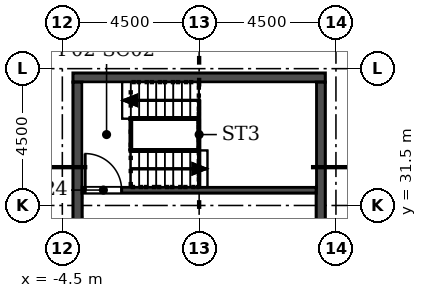
"""IFC4 building model, lengths in metres.
Left out: names, types, materials, properties, quantities, classifications, styles, units other than length and angle.
Written with IfcOpenShell. Run it as: python <this file> out.ifc"""

import sys

from ifc_helpers import new_model, si_unit, direction, frame, frame_2d, origin, place, context, subcontext, project, spatial, rectangle, extrude, element, fill, save


model = new_model("IFC4")
c1 = context("Model", 3, precision=1e-05, world=origin(), true_north=direction((0.0, 1.0)))
c2 = subcontext(c1, "Body", "Model", "MODEL_VIEW")
j1 = project(units=[si_unit("LENGTHUNIT", "METRE"), si_unit("PLANEANGLEUNIT", "RADIAN")], contexts=[c1])
p1 = place(None, origin())
s1 = spatial("IfcSite", under=j1, at=p1, CompositionType="ELEMENT")
p2 = place(p1, origin())
s2 = spatial("IfcBuilding", under=s1, at=p2, CompositionType="ELEMENT")
p3 = place(p2, frame((0.0, 0.0, 14.0)))
s3 = spatial("IfcBuildingStorey", under=s2, at=p3, CompositionType="ELEMENT", Elevation=14.0)
p4 = place(p3, frame((42.853, 8.575, 0.0), z_axis=(0.0, 0.0, 1.0), x_axis=(-0.49999894854, 0.866026010844, 0.0)))
e1 = element("IfcWall", 1, at=p4, inside=s3, PredefinedType="SOLIDWALL", context=c2, shape_type="SweptSolid", body=[
    extrude(rectangle(XDim=76.0, YDim=0.34, at=frame_2d((38.0, 0.0))), origin(), (0.0, 0.0, 1.0), 5.7),
])
p5 = place(p4, frame((1.058, 0.0, 0.9)))
e2 = element("IfcOpeningElement", 2, at=p5, cuts=e1, PredefinedType="OPENING", context=c2, shape_type="SweptSolid", body=[
    extrude(rectangle(XDim=1.885, YDim=3.5, at=frame_2d((0.942, 1.75))), frame((0.0, 0.18, 0.0), z_axis=(0.0, -1.0, 0.0), x_axis=(1.0, 0.0, 0.0)), (0.0, 0.0, 1.0), 0.36),
])
p6 = place(p4, frame((4.058, 0.0, 0.9)))
e3 = element("IfcOpeningElement", 3, at=p6, cuts=e1, PredefinedType="OPENING", context=c2, shape_type="SweptSolid", body=[
    extrude(rectangle(XDim=1.885, YDim=3.5, at=frame_2d((0.942, 1.75))), frame((0.0, 0.18, 0.0), z_axis=(0.0, -1.0, 0.0), x_axis=(1.0, 0.0, 0.0)), (0.0, 0.0, 1.0), 0.36),
])
p7 = place(p4, frame((7.058, 0.0, 0.9)))
e4 = element("IfcOpeningElement", 4, at=p7, cuts=e1, PredefinedType="OPENING", context=c2, shape_type="SweptSolid", body=[
    extrude(rectangle(XDim=1.885, YDim=3.5, at=frame_2d((0.942, 1.75))), frame((0.0, 0.18, 0.0), z_axis=(0.0, -1.0, 0.0), x_axis=(1.0, 0.0, 0.0)), (0.0, 0.0, 1.0), 0.36),
])
p8 = place(p4, frame((10.058, 0.0, 0.9)))
e5 = element("IfcOpeningElement", 5, at=p8, cuts=e1, PredefinedType="OPENING", context=c2, shape_type="SweptSolid", body=[
    extrude(rectangle(XDim=1.885, YDim=3.5, at=frame_2d((0.942, 1.75))), frame((0.0, 0.18, 0.0), z_axis=(0.0, -1.0, 0.0), x_axis=(1.0, 0.0, 0.0)), (0.0, 0.0, 1.0), 0.36),
])
p9 = place(p4, frame((13.058, 0.0, 0.9)))
e6 = element("IfcOpeningElement", 6, at=p9, cuts=e1, PredefinedType="OPENING", context=c2, shape_type="SweptSolid", body=[
    extrude(rectangle(XDim=1.885, YDim=3.5, at=frame_2d((0.942, 1.75))), frame((0.0, 0.18, 0.0), z_axis=(0.0, -1.0, 0.0), x_axis=(1.0, 0.0, 0.0)), (0.0, 0.0, 1.0), 0.36),
])
p10 = place(p4, frame((16.058, 0.0, 0.9)))
e7 = element("IfcOpeningElement", 7, at=p10, cuts=e1, PredefinedType="OPENING", context=c2, shape_type="SweptSolid", body=[
    extrude(rectangle(XDim=1.885, YDim=3.5, at=frame_2d((0.942, 1.75))), frame((0.0, 0.18, 0.0), z_axis=(0.0, -1.0, 0.0), x_axis=(1.0, 0.0, 0.0)), (0.0, 0.0, 1.0), 0.36),
])
p11 = place(p4, frame((19.058, 0.0, 0.9)))
e8 = element("IfcOpeningElement", 8, at=p11, cuts=e1, PredefinedType="OPENING", context=c2, shape_type="SweptSolid", body=[
    extrude(rectangle(XDim=1.885, YDim=3.5, at=frame_2d((0.942, 1.75))), frame((0.0, 0.18, 0.0), z_axis=(0.0, -1.0, 0.0), x_axis=(1.0, 0.0, 0.0)), (0.0, 0.0, 1.0), 0.36),
])
p12 = place(p4, frame((22.058, 0.0, 0.9)))
e9 = element("IfcOpeningElement", 9, at=p12, cuts=e1, PredefinedType="OPENING", context=c2, shape_type="SweptSolid", body=[
    extrude(rectangle(XDim=1.885, YDim=3.5, at=frame_2d((0.942, 1.75))), frame((0.0, 0.18, 0.0), z_axis=(0.0, -1.0, 0.0), x_axis=(1.0, 0.0, 0.0)), (0.0, 0.0, 1.0), 0.36),
])
p13 = place(p4, frame((25.058, 0.0, 0.9)))
e10 = element("IfcOpeningElement", 10, at=p13, cuts=e1, PredefinedType="OPENING", context=c2, shape_type="SweptSolid", body=[
    extrude(rectangle(XDim=1.885, YDim=3.5, at=frame_2d((0.942, 1.75))), frame((0.0, 0.18, 0.0), z_axis=(0.0, -1.0, 0.0), x_axis=(1.0, 0.0, 0.0)), (0.0, 0.0, 1.0), 0.36),
])
p14 = place(p4, frame((28.058, 0.0, 0.9)))
e11 = element("IfcOpeningElement", 11, at=p14, cuts=e1, PredefinedType="OPENING", context=c2, shape_type="SweptSolid", body=[
    extrude(rectangle(XDim=1.885, YDim=3.5, at=frame_2d((0.942, 1.75))), frame((0.0, 0.18, 0.0), z_axis=(0.0, -1.0, 0.0), x_axis=(1.0, 0.0, 0.0)), (0.0, 0.0, 1.0), 0.36),
])
p15 = place(p4, frame((31.058, 0.0, 0.9)))
e12 = element("IfcOpeningElement", 12, at=p15, cuts=e1, PredefinedType="OPENING", context=c2, shape_type="SweptSolid", body=[
    extrude(rectangle(XDim=1.885, YDim=3.5, at=frame_2d((0.942, 1.75))), frame((0.0, 0.18, 0.0), z_axis=(0.0, -1.0, 0.0), x_axis=(1.0, 0.0, 0.0)), (0.0, 0.0, 1.0), 0.36),
])
p16 = place(p4, frame((34.058, 0.0, 0.9)))
e13 = element("IfcOpeningElement", 13, at=p16, cuts=e1, PredefinedType="OPENING", context=c2, shape_type="SweptSolid", body=[
    extrude(rectangle(XDim=1.885, YDim=3.5, at=frame_2d((0.942, 1.75))), frame((0.0, 0.18, 0.0), z_axis=(0.0, -1.0, 0.0), x_axis=(1.0, 0.0, 0.0)), (0.0, 0.0, 1.0), 0.36),
])
p17 = place(p4, frame((37.058, 0.0, 0.9)))
e14 = element("IfcOpeningElement", 14, at=p17, cuts=e1, PredefinedType="OPENING", context=c2, shape_type="SweptSolid", body=[
    extrude(rectangle(XDim=1.885, YDim=3.5, at=frame_2d((0.942, 1.75))), frame((0.0, 0.18, 0.0), z_axis=(0.0, -1.0, 0.0), x_axis=(1.0, 0.0, 0.0)), (0.0, 0.0, 1.0), 0.36),
])
p18 = place(p4, frame((40.058, 0.0, 0.9)))
e15 = element("IfcOpeningElement", 15, at=p18, cuts=e1, PredefinedType="OPENING", context=c2, shape_type="SweptSolid", body=[
    extrude(rectangle(XDim=1.885, YDim=3.5, at=frame_2d((0.942, 1.75))), frame((0.0, 0.18, 0.0), z_axis=(0.0, -1.0, 0.0), x_axis=(1.0, 0.0, 0.0)), (0.0, 0.0, 1.0), 0.36),
])
p19 = place(p4, frame((43.058, 0.0, 0.9)))
e16 = element("IfcOpeningElement", 16, at=p19, cuts=e1, PredefinedType="OPENING", context=c2, shape_type="SweptSolid", body=[
    extrude(rectangle(XDim=1.885, YDim=3.5, at=frame_2d((0.942, 1.75))), frame((0.0, 0.18, 0.0), z_axis=(0.0, -1.0, 0.0), x_axis=(1.0, 0.0, 0.0)), (0.0, 0.0, 1.0), 0.36),
])
p20 = place(p4, frame((46.058, 0.0, 0.9)))
e17 = element("IfcOpeningElement", 17, at=p20, cuts=e1, PredefinedType="OPENING", context=c2, shape_type="SweptSolid", body=[
    extrude(rectangle(XDim=1.885, YDim=3.5, at=frame_2d((0.942, 1.75))), frame((0.0, 0.18, 0.0), z_axis=(0.0, -1.0, 0.0), x_axis=(1.0, 0.0, 0.0)), (0.0, 0.0, 1.0), 0.36),
])
p21 = place(p4, frame((49.058, 0.0, 0.9)))
e18 = element("IfcOpeningElement", 18, at=p21, cuts=e1, PredefinedType="OPENING", context=c2, shape_type="SweptSolid", body=[
    extrude(rectangle(XDim=1.885, YDim=3.5, at=frame_2d((0.942, 1.75))), frame((0.0, 0.18, 0.0), z_axis=(0.0, -1.0, 0.0), x_axis=(1.0, 0.0, 0.0)), (0.0, 0.0, 1.0), 0.36),
])
p22 = place(p4, frame((52.058, 0.0, 0.9)))
e19 = element("IfcOpeningElement", 19, at=p22, cuts=e1, PredefinedType="OPENING", context=c2, shape_type="SweptSolid", body=[
    extrude(rectangle(XDim=1.885, YDim=3.5, at=frame_2d((0.942, 1.75))), frame((0.0, 0.18, 0.0), z_axis=(0.0, -1.0, 0.0), x_axis=(1.0, 0.0, 0.0)), (0.0, 0.0, 1.0), 0.36),
])
p23 = place(p4, frame((55.058, 0.0, 0.9)))
e20 = element("IfcOpeningElement", 20, at=p23, cuts=e1, PredefinedType="OPENING", context=c2, shape_type="SweptSolid", body=[
    extrude(rectangle(XDim=1.885, YDim=3.5, at=frame_2d((0.942, 1.75))), frame((0.0, 0.18, 0.0), z_axis=(0.0, -1.0, 0.0), x_axis=(1.0, 0.0, 0.0)), (0.0, 0.0, 1.0), 0.36),
])
p24 = place(p4, frame((58.058, 0.0, 0.9)))
e21 = element("IfcOpeningElement", 21, at=p24, cuts=e1, PredefinedType="OPENING", context=c2, shape_type="SweptSolid", body=[
    extrude(rectangle(XDim=1.885, YDim=3.5, at=frame_2d((0.942, 1.75))), frame((0.0, 0.18, 0.0), z_axis=(0.0, -1.0, 0.0), x_axis=(1.0, 0.0, 0.0)), (0.0, 0.0, 1.0), 0.36),
])
p25 = place(p4, frame((61.058, 0.0, 0.9)))
e22 = element("IfcOpeningElement", 22, at=p25, cuts=e1, PredefinedType="OPENING", context=c2, shape_type="SweptSolid", body=[
    extrude(rectangle(XDim=1.885, YDim=3.5, at=frame_2d((0.942, 1.75))), frame((0.0, 0.18, 0.0), z_axis=(0.0, -1.0, 0.0), x_axis=(1.0, 0.0, 0.0)), (0.0, 0.0, 1.0), 0.36),
])
p26 = place(p4, frame((64.058, 0.0, 0.9)))
e23 = element("IfcOpeningElement", 23, at=p26, cuts=e1, PredefinedType="OPENING", context=c2, shape_type="SweptSolid", body=[
    extrude(rectangle(XDim=1.885, YDim=3.5, at=frame_2d((0.942, 1.75))), frame((0.0, 0.18, 0.0), z_axis=(0.0, -1.0, 0.0), x_axis=(1.0, 0.0, 0.0)), (0.0, 0.0, 1.0), 0.36),
])
p27 = place(p4, frame((67.058, 0.0, 0.9)))
e24 = element("IfcOpeningElement", 24, at=p27, cuts=e1, PredefinedType="OPENING", context=c2, shape_type="SweptSolid", body=[
    extrude(rectangle(XDim=1.885, YDim=3.5, at=frame_2d((0.942, 1.75))), frame((0.0, 0.18, 0.0), z_axis=(0.0, -1.0, 0.0), x_axis=(1.0, 0.0, 0.0)), (0.0, 0.0, 1.0), 0.36),
])
p28 = place(p4, frame((70.058, 0.0, 0.9)))
e25 = element("IfcOpeningElement", 25, at=p28, cuts=e1, PredefinedType="OPENING", context=c2, shape_type="SweptSolid", body=[
    extrude(rectangle(XDim=1.885, YDim=3.5, at=frame_2d((0.942, 1.75))), frame((0.0, 0.18, 0.0), z_axis=(0.0, -1.0, 0.0), x_axis=(1.0, 0.0, 0.0)), (0.0, 0.0, 1.0), 0.36),
])
p29 = place(p4, frame((73.058, 0.0, 0.9)))
e26 = element("IfcOpeningElement", 26, at=p29, cuts=e1, PredefinedType="OPENING", context=c2, shape_type="SweptSolid", body=[
    extrude(rectangle(XDim=1.885, YDim=3.5, at=frame_2d((0.942, 1.75))), frame((0.0, 0.18, 0.0), z_axis=(0.0, -1.0, 0.0), x_axis=(1.0, 0.0, 0.0)), (0.0, 0.0, 1.0), 0.36),
])
p30 = place(p3, frame((-4.853, 74.393, 0.0), z_axis=(0.0, 0.0, 1.0), x_axis=(-0.49999894854, -0.866026010844, 0.0)))
e27 = element("IfcWall", 27, at=p30, inside=s3, PredefinedType="SOLIDWALL", context=c2, shape_type="SweptSolid", body=[
    extrude(rectangle(XDim=76.0, YDim=0.34, at=frame_2d((38.0, 0.0))), origin(), (0.0, 0.0, 1.0), 5.7),
])
p31 = place(p30, frame((1.058, 0.0, 0.9)))
e28 = element("IfcOpeningElement", 28, at=p31, cuts=e27, PredefinedType="OPENING", context=c2, shape_type="SweptSolid", body=[
    extrude(rectangle(XDim=1.885, YDim=3.5, at=frame_2d((0.942, 1.75))), frame((0.0, 0.18, 0.0), z_axis=(0.0, -1.0, 0.0), x_axis=(1.0, 0.0, 0.0)), (0.0, 0.0, 1.0), 0.36),
])
p32 = place(p30, frame((4.058, 0.0, 0.9)))
e29 = element("IfcOpeningElement", 29, at=p32, cuts=e27, PredefinedType="OPENING", context=c2, shape_type="SweptSolid", body=[
    extrude(rectangle(XDim=1.885, YDim=3.5, at=frame_2d((0.942, 1.75))), frame((0.0, 0.18, 0.0), z_axis=(0.0, -1.0, 0.0), x_axis=(1.0, 0.0, 0.0)), (0.0, 0.0, 1.0), 0.36),
])
p33 = place(p30, frame((7.058, 0.0, 0.9)))
e30 = element("IfcOpeningElement", 30, at=p33, cuts=e27, PredefinedType="OPENING", context=c2, shape_type="SweptSolid", body=[
    extrude(rectangle(XDim=1.885, YDim=3.5, at=frame_2d((0.942, 1.75))), frame((0.0, 0.18, 0.0), z_axis=(0.0, -1.0, 0.0), x_axis=(1.0, 0.0, 0.0)), (0.0, 0.0, 1.0), 0.36),
])
p34 = place(p30, frame((10.058, 0.0, 0.9)))
e31 = element("IfcOpeningElement", 31, at=p34, cuts=e27, PredefinedType="OPENING", context=c2, shape_type="SweptSolid", body=[
    extrude(rectangle(XDim=1.885, YDim=3.5, at=frame_2d((0.942, 1.75))), frame((0.0, 0.18, 0.0), z_axis=(0.0, -1.0, 0.0), x_axis=(1.0, 0.0, 0.0)), (0.0, 0.0, 1.0), 0.36),
])
p35 = place(p30, frame((13.058, 0.0, 0.9)))
e32 = element("IfcOpeningElement", 32, at=p35, cuts=e27, PredefinedType="OPENING", context=c2, shape_type="SweptSolid", body=[
    extrude(rectangle(XDim=1.885, YDim=3.5, at=frame_2d((0.942, 1.75))), frame((0.0, 0.18, 0.0), z_axis=(0.0, -1.0, 0.0), x_axis=(1.0, 0.0, 0.0)), (0.0, 0.0, 1.0), 0.36),
])
p36 = place(p30, frame((16.058, 0.0, 0.9)))
e33 = element("IfcOpeningElement", 33, at=p36, cuts=e27, PredefinedType="OPENING", context=c2, shape_type="SweptSolid", body=[
    extrude(rectangle(XDim=1.885, YDim=3.5, at=frame_2d((0.942, 1.75))), frame((0.0, 0.18, 0.0), z_axis=(0.0, -1.0, 0.0), x_axis=(1.0, 0.0, 0.0)), (0.0, 0.0, 1.0), 0.36),
])
p37 = place(p30, frame((19.058, 0.0, 0.9)))
e34 = element("IfcOpeningElement", 34, at=p37, cuts=e27, PredefinedType="OPENING", context=c2, shape_type="SweptSolid", body=[
    extrude(rectangle(XDim=1.885, YDim=3.5, at=frame_2d((0.942, 1.75))), frame((0.0, 0.18, 0.0), z_axis=(0.0, -1.0, 0.0), x_axis=(1.0, 0.0, 0.0)), (0.0, 0.0, 1.0), 0.36),
])
p38 = place(p30, frame((22.058, 0.0, 0.9)))
e35 = element("IfcOpeningElement", 35, at=p38, cuts=e27, PredefinedType="OPENING", context=c2, shape_type="SweptSolid", body=[
    extrude(rectangle(XDim=1.885, YDim=3.5, at=frame_2d((0.942, 1.75))), frame((0.0, 0.18, 0.0), z_axis=(0.0, -1.0, 0.0), x_axis=(1.0, 0.0, 0.0)), (0.0, 0.0, 1.0), 0.36),
])
p39 = place(p30, frame((25.058, 0.0, 0.9)))
e36 = element("IfcOpeningElement", 36, at=p39, cuts=e27, PredefinedType="OPENING", context=c2, shape_type="SweptSolid", body=[
    extrude(rectangle(XDim=1.885, YDim=3.5, at=frame_2d((0.942, 1.75))), frame((0.0, 0.18, 0.0), z_axis=(0.0, -1.0, 0.0), x_axis=(1.0, 0.0, 0.0)), (0.0, 0.0, 1.0), 0.36),
])
p40 = place(p30, frame((28.058, 0.0, 0.9)))
e37 = element("IfcOpeningElement", 37, at=p40, cuts=e27, PredefinedType="OPENING", context=c2, shape_type="SweptSolid", body=[
    extrude(rectangle(XDim=1.885, YDim=3.5, at=frame_2d((0.942, 1.75))), frame((0.0, 0.18, 0.0), z_axis=(0.0, -1.0, 0.0), x_axis=(1.0, 0.0, 0.0)), (0.0, 0.0, 1.0), 0.36),
])
p41 = place(p30, frame((31.058, 0.0, 0.9)))
e38 = element("IfcOpeningElement", 38, at=p41, cuts=e27, PredefinedType="OPENING", context=c2, shape_type="SweptSolid", body=[
    extrude(rectangle(XDim=1.885, YDim=3.5, at=frame_2d((0.942, 1.75))), frame((0.0, 0.18, 0.0), z_axis=(0.0, -1.0, 0.0), x_axis=(1.0, 0.0, 0.0)), (0.0, 0.0, 1.0), 0.36),
])
p42 = place(p30, frame((34.058, 0.0, 0.9)))
e39 = element("IfcOpeningElement", 39, at=p42, cuts=e27, PredefinedType="OPENING", context=c2, shape_type="SweptSolid", body=[
    extrude(rectangle(XDim=1.885, YDim=3.5, at=frame_2d((0.942, 1.75))), frame((0.0, 0.18, 0.0), z_axis=(0.0, -1.0, 0.0), x_axis=(1.0, 0.0, 0.0)), (0.0, 0.0, 1.0), 0.36),
])
p43 = place(p30, frame((37.058, 0.0, 0.9)))
e40 = element("IfcOpeningElement", 40, at=p43, cuts=e27, PredefinedType="OPENING", context=c2, shape_type="SweptSolid", body=[
    extrude(rectangle(XDim=1.885, YDim=3.5, at=frame_2d((0.942, 1.75))), frame((0.0, 0.18, 0.0), z_axis=(0.0, -1.0, 0.0), x_axis=(1.0, 0.0, 0.0)), (0.0, 0.0, 1.0), 0.36),
])
p44 = place(p30, frame((40.058, 0.0, 0.9)))
e41 = element("IfcOpeningElement", 41, at=p44, cuts=e27, PredefinedType="OPENING", context=c2, shape_type="SweptSolid", body=[
    extrude(rectangle(XDim=1.885, YDim=3.5, at=frame_2d((0.942, 1.75))), frame((0.0, 0.18, 0.0), z_axis=(0.0, -1.0, 0.0), x_axis=(1.0, 0.0, 0.0)), (0.0, 0.0, 1.0), 0.36),
])
p45 = place(p30, frame((43.058, 0.0, 0.9)))
e42 = element("IfcOpeningElement", 42, at=p45, cuts=e27, PredefinedType="OPENING", context=c2, shape_type="SweptSolid", body=[
    extrude(rectangle(XDim=1.885, YDim=3.5, at=frame_2d((0.942, 1.75))), frame((0.0, 0.18, 0.0), z_axis=(0.0, -1.0, 0.0), x_axis=(1.0, 0.0, 0.0)), (0.0, 0.0, 1.0), 0.36),
])
p46 = place(p30, frame((46.058, 0.0, 0.9)))
e43 = element("IfcOpeningElement", 43, at=p46, cuts=e27, PredefinedType="OPENING", context=c2, shape_type="SweptSolid", body=[
    extrude(rectangle(XDim=1.885, YDim=3.5, at=frame_2d((0.942, 1.75))), frame((0.0, 0.18, 0.0), z_axis=(0.0, -1.0, 0.0), x_axis=(1.0, 0.0, 0.0)), (0.0, 0.0, 1.0), 0.36),
])
p47 = place(p30, frame((49.058, 0.0, 0.9)))
e44 = element("IfcOpeningElement", 44, at=p47, cuts=e27, PredefinedType="OPENING", context=c2, shape_type="SweptSolid", body=[
    extrude(rectangle(XDim=1.885, YDim=3.5, at=frame_2d((0.942, 1.75))), frame((0.0, 0.18, 0.0), z_axis=(0.0, -1.0, 0.0), x_axis=(1.0, 0.0, 0.0)), (0.0, 0.0, 1.0), 0.36),
])
p48 = place(p30, frame((52.058, 0.0, 0.9)))
e45 = element("IfcOpeningElement", 45, at=p48, cuts=e27, PredefinedType="OPENING", context=c2, shape_type="SweptSolid", body=[
    extrude(rectangle(XDim=1.885, YDim=3.5, at=frame_2d((0.942, 1.75))), frame((0.0, 0.18, 0.0), z_axis=(0.0, -1.0, 0.0), x_axis=(1.0, 0.0, 0.0)), (0.0, 0.0, 1.0), 0.36),
])
p49 = place(p30, frame((55.058, 0.0, 0.9)))
e46 = element("IfcOpeningElement", 46, at=p49, cuts=e27, PredefinedType="OPENING", context=c2, shape_type="SweptSolid", body=[
    extrude(rectangle(XDim=1.885, YDim=3.5, at=frame_2d((0.942, 1.75))), frame((0.0, 0.18, 0.0), z_axis=(0.0, -1.0, 0.0), x_axis=(1.0, 0.0, 0.0)), (0.0, 0.0, 1.0), 0.36),
])
p50 = place(p30, frame((58.058, 0.0, 0.9)))
e47 = element("IfcOpeningElement", 47, at=p50, cuts=e27, PredefinedType="OPENING", context=c2, shape_type="SweptSolid", body=[
    extrude(rectangle(XDim=1.885, YDim=3.5, at=frame_2d((0.942, 1.75))), frame((0.0, 0.18, 0.0), z_axis=(0.0, -1.0, 0.0), x_axis=(1.0, 0.0, 0.0)), (0.0, 0.0, 1.0), 0.36),
])
p51 = place(p30, frame((61.058, 0.0, 0.9)))
e48 = element("IfcOpeningElement", 48, at=p51, cuts=e27, PredefinedType="OPENING", context=c2, shape_type="SweptSolid", body=[
    extrude(rectangle(XDim=1.885, YDim=3.5, at=frame_2d((0.942, 1.75))), frame((0.0, 0.18, 0.0), z_axis=(0.0, -1.0, 0.0), x_axis=(1.0, 0.0, 0.0)), (0.0, 0.0, 1.0), 0.36),
])
p52 = place(p30, frame((64.058, 0.0, 0.9)))
e49 = element("IfcOpeningElement", 49, at=p52, cuts=e27, PredefinedType="OPENING", context=c2, shape_type="SweptSolid", body=[
    extrude(rectangle(XDim=1.885, YDim=3.5, at=frame_2d((0.942, 1.75))), frame((0.0, 0.18, 0.0), z_axis=(0.0, -1.0, 0.0), x_axis=(1.0, 0.0, 0.0)), (0.0, 0.0, 1.0), 0.36),
])
p53 = place(p30, frame((67.058, 0.0, 0.9)))
e50 = element("IfcOpeningElement", 50, at=p53, cuts=e27, PredefinedType="OPENING", context=c2, shape_type="SweptSolid", body=[
    extrude(rectangle(XDim=1.885, YDim=3.5, at=frame_2d((0.942, 1.75))), frame((0.0, 0.18, 0.0), z_axis=(0.0, -1.0, 0.0), x_axis=(1.0, 0.0, 0.0)), (0.0, 0.0, 1.0), 0.36),
])
p54 = place(p30, frame((70.058, 0.0, 0.9)))
e51 = element("IfcOpeningElement", 51, at=p54, cuts=e27, PredefinedType="OPENING", context=c2, shape_type="SweptSolid", body=[
    extrude(rectangle(XDim=1.885, YDim=3.5, at=frame_2d((0.942, 1.75))), frame((0.0, 0.18, 0.0), z_axis=(0.0, -1.0, 0.0), x_axis=(1.0, 0.0, 0.0)), (0.0, 0.0, 1.0), 0.36),
])
p55 = place(p30, frame((73.058, 0.0, 0.9)))
e52 = element("IfcOpeningElement", 52, at=p55, cuts=e27, PredefinedType="OPENING", context=c2, shape_type="SweptSolid", body=[
    extrude(rectangle(XDim=1.885, YDim=3.5, at=frame_2d((0.942, 1.75))), frame((0.0, 0.18, 0.0), z_axis=(0.0, -1.0, 0.0), x_axis=(1.0, 0.0, 0.0)), (0.0, 0.0, 1.0), 0.36),
])
p56 = place(p3, frame((-4.15, 35.707, -0.3), z_axis=(0.0, 0.0, 1.0), x_axis=(1.0, 0.0, 0.0)))
e53 = element("IfcWall", 53, at=p56, inside=s3, PredefinedType="SOLIDWALL", context=c2, shape_type="SweptSolid", body=[
    extrude(rectangle(XDim=8.3, YDim=0.3, at=frame_2d((4.15, 0.0))), origin(), (0.0, 0.0, 1.0), 6.0),
])
for number, where, z_axis, x_axis in (
    (54, (-4.0, 29.057, -0.3), (0.0, 0.0, 1.0), (0.0, 1.0, 0.0)),
    (55, (4.0, 29.057, -0.3), (0.0, 0.0, 1.0), (0.0, 1.0, 0.0)),
):
    element("IfcWall", number, at=place(p3, frame(where, z_axis=z_axis, x_axis=x_axis)), inside=s3, PredefinedType="SOLIDWALL", context=c2, shape_type="SweptSolid", body=[
        extrude(rectangle(XDim=6.5, YDim=0.3, at=frame_2d((3.25, 0.0))), origin(), (0.0, 0.0, 1.0), 6.0),
    ])
p57 = place(p3, frame((-3.85, 32.007, -0.3), z_axis=(0.0, 0.0, 1.0), x_axis=(1.0, 0.0, 0.0)))
e56 = element("IfcWall", 56, at=p57, inside=s3, PredefinedType="SOLIDWALL", context=c2, shape_type="SweptSolid", body=[
    extrude(rectangle(XDim=7.7, YDim=0.2, at=frame_2d((3.85, 0.0))), origin(), (0.0, 0.0, 1.0), 6.0),
])
p58 = place(p57, frame((0.1, 0.0, 0.3)))
e57 = element("IfcOpeningElement", 57, at=p58, cuts=e56, PredefinedType="OPENING", context=c2, shape_type="SweptSolid", body=[
    extrude(rectangle(XDim=1.2, YDim=2.1, at=frame_2d((0.6, 1.05))), frame((0.0, 0.11, 0.0), z_axis=(0.0, -1.0, 0.0), x_axis=(1.0, 0.0, 0.0)), (0.0, 0.0, 1.0), 0.22),
])
p59 = place(p58, origin())
e58 = element("IfcDoor", 58, at=p59, inside=s3, OperationType="SINGLE_SWING_LEFT", PredefinedType="DOOR", context=c2, shape_type="SweptSolid", body=[
    extrude(rectangle(XDim=1.2, YDim=2.1, at=frame_2d((0.6, 1.05))), frame((0.0, 0.025, 0.0), z_axis=(0.0, -1.0, 0.0), x_axis=(1.0, 0.0, 0.0)), (0.0, 0.0, 1.0), 0.05),
])
fill(e57, e58)
save(model, sys.argv[1])
